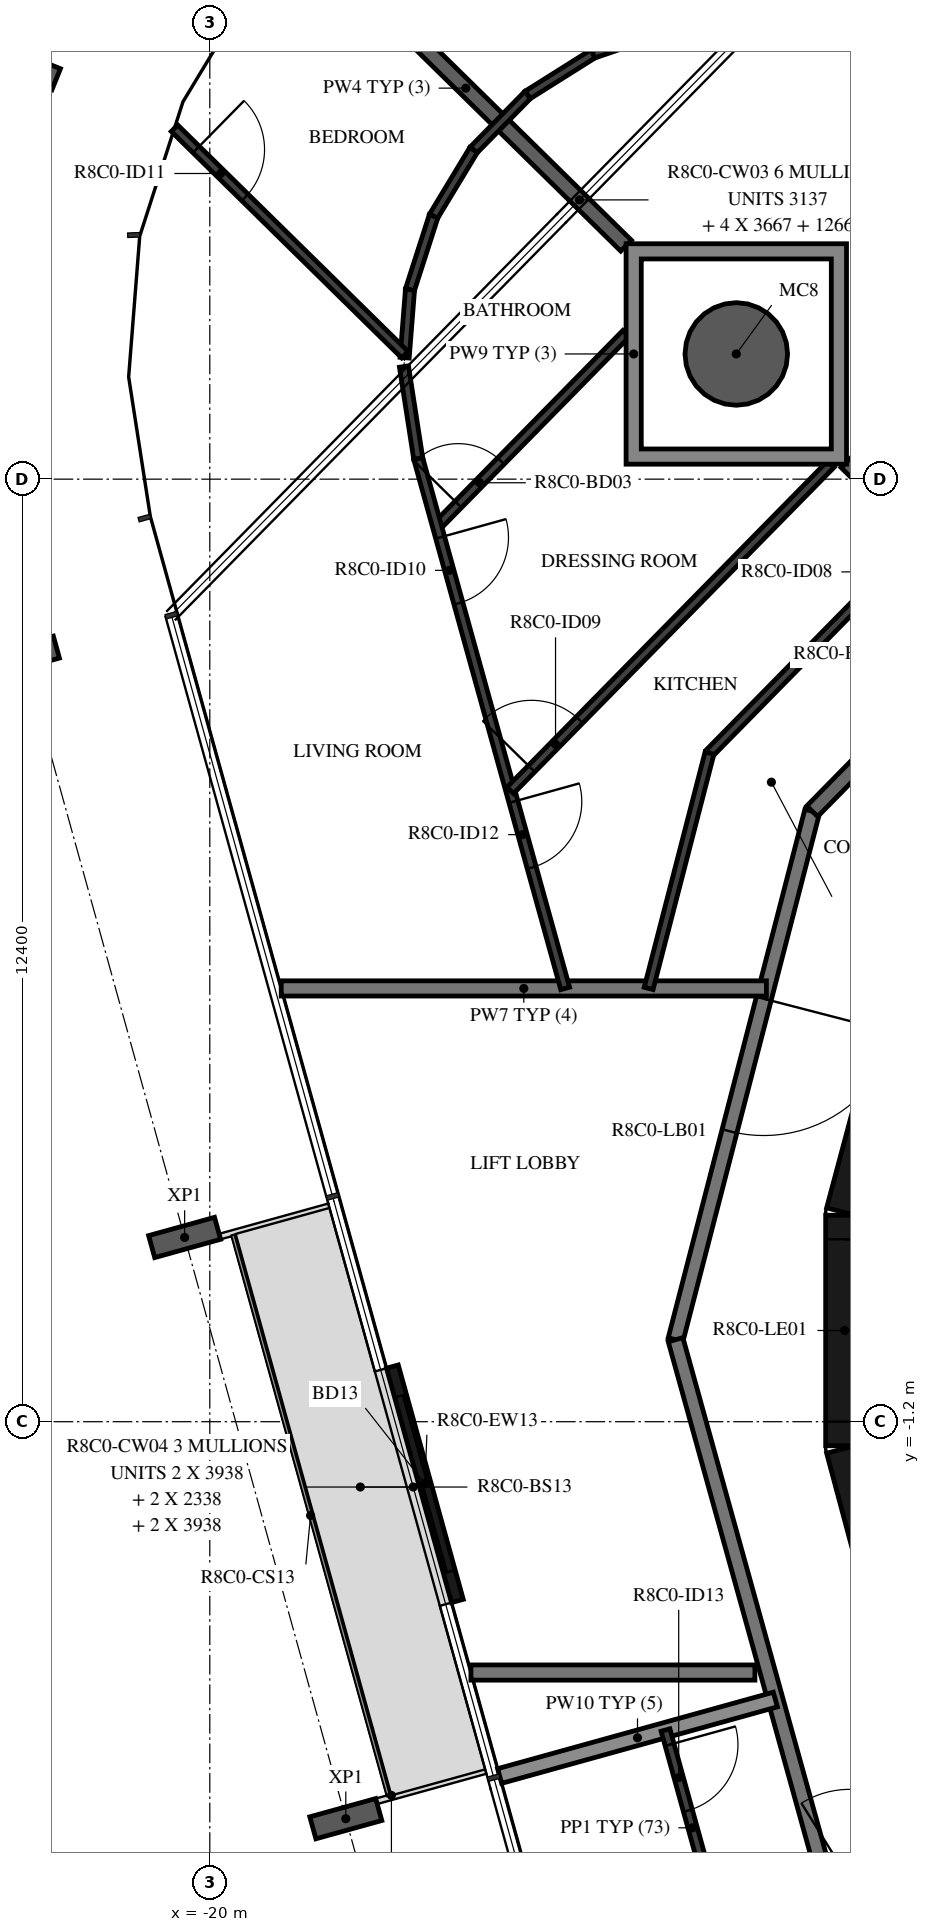
"""IFC4 building model, lengths in metres.
Left out: names, types, materials, properties, quantities, classifications, styles, units other than length and angle.
Written with IfcOpenShell. Run it as: python <this file> out.ifc"""

import sys

from ifc_helpers import new_model, si_unit, direction, frame, frame_2d, origin, origin_2d, place, context, subcontext, project, spatial, polyline, rectangle, hollow_circle, i_section, outline, extrude, element, fill, save


model = new_model("IFC4")
c1 = context("Model", 3, precision=1e-05, world=origin(), true_north=direction((0.0, 1.0)))
c2 = subcontext(c1, "Body", "Model", "MODEL_VIEW")
j1 = project(units=[si_unit("LENGTHUNIT", "METRE"), si_unit("PLANEANGLEUNIT", "RADIAN")], contexts=[c1])
p1 = place(None, origin())
s1 = spatial("IfcSite", under=j1, at=p1, CompositionType="ELEMENT")
p2 = place(p1, origin())
s2 = spatial("IfcBuilding", under=s1, at=p2, CompositionType="ELEMENT")
p3 = place(p2, frame((0.0, 0.0, 319.2)))
s3 = spatial("IfcBuildingStorey", under=s2, at=p3, CompositionType="ELEMENT", Elevation=319.2)
p4 = place(p3, frame((-13.073, 12.847, -0.38), z_axis=(0.0, 0.0, 1.0), x_axis=(1.0, 0.0, 0.0)))
e1 = element("IfcColumn", 1, at=p4, inside=s3, PredefinedType="COLUMN", context=c2, shape_type="SweptSolid", body=[
    extrude(hollow_circle(Radius=0.675, WallThickness=0.03, at=origin_2d()), origin(), (0.0, 0.0, 1.0), 3.5),
])
for number, where, z_axis, x_axis in (
    (2, (-22.438, 16.629, -0.38), (0.0, 0.0, 1.0), (0.374, 0.927, 0.0)),
    (3, (-22.452, 8.87, -0.38), (0.0, 0.0, 1.0), (-0.267, 0.964, 0.0)),
    (4, (-20.331, 1.224, -0.38), (0.0, 0.0, 1.0), (-0.267, 0.964, 0.0)),
    (5, (-18.211, -6.423, -0.38), (0.0, 0.0, 1.0), (-0.267, 0.964, 0.0)),
):
    element("IfcColumn", number, at=place(p3, frame(where, z_axis=z_axis, x_axis=x_axis)), inside=s3, PredefinedType="COLUMN", context=c2, shape_type="SweptSolid", body=[
        extrude(i_section(OverallWidth=0.3, OverallDepth=0.9, WebThickness=0.019, FlangeThickness=0.035, FilletRadius=0.03, at=origin_2d()), origin(), (0.0, 0.0, 1.0), 3.5),
    ])
p5 = place(p3, frame((-17.598, -0.475, 0.0), z_axis=(0.0, 0.0, 1.0), x_axis=(0.267266077957, -0.963622770369, 0.0)))
e6 = element("IfcWall", 6, at=p5, inside=s3, PredefinedType="STANDARD", context=c2, shape_type="SweptSolid", body=[
    extrude(rectangle(XDim=3.2, YDim=0.16, at=frame_2d((1.6, 0.0))), origin(), (0.0, 0.0, 1.0), 3.12),
])
p6 = place(p5, frame((0.4, 0.0, 0.0)))
e7 = element("IfcOpeningElement", 7, at=p6, cuts=e6, PredefinedType="OPENING", context=c2, shape_type="SweptSolid", body=[
    extrude(rectangle(XDim=2.4, YDim=2.4, at=frame_2d((1.2, 1.2))), frame((0.0, 0.09, 0.0), z_axis=(0.0, -1.0, 0.0), x_axis=(1.0, 0.0, 0.0)), (0.0, 0.0, 1.0), 0.18),
])
p7 = place(p3, frame((-10.858, 4.479, 0.0), z_axis=(0.0, 0.0, 1.0), x_axis=(-0.258734743916, -0.965948410781, 0.0)))
e8 = element("IfcWall", 8, at=p7, inside=s3, PredefinedType="SHEAR", context=c2, shape_type="SweptSolid", body=[
    extrude(rectangle(XDim=3.033, YDim=0.5, at=frame_2d((1.516, 0.0))), origin(), (0.0, 0.0, 1.0), 3.12),
])
p8 = place(p3, frame((-11.647, 1.516, 0.0), z_axis=(0.0, 0.0, 1.0), x_axis=(0.0, -1.0, 0.0)))
e9 = element("IfcWall", 9, at=p8, inside=s3, PredefinedType="SHEAR", context=c2, shape_type="SweptSolid", body=[
    extrude(rectangle(XDim=3.033, YDim=0.5, at=frame_2d((1.516, 0.0))), origin(), (0.0, 0.0, 1.0), 3.12),
])
p9 = place(p8, frame((0.316, 0.0, 0.0)))
e10 = element("IfcOpeningElement", 10, at=p9, cuts=e9, PredefinedType="OPENING", context=c2, shape_type="SweptSolid", body=[
    extrude(rectangle(XDim=2.4, YDim=2.1, at=frame_2d((1.2, 1.05))), frame((0.0, 0.26, 0.0), z_axis=(0.0, -1.0, 0.0), x_axis=(1.0, 0.0, 0.0)), (0.0, 0.0, 1.0), 0.52),
])
p10 = place(p3, frame((-11.643, -1.55, 0.0), z_axis=(0.0, 0.0, 1.0), x_axis=(0.258734743916, -0.965948410781, 0.0)))
e11 = element("IfcWall", 11, at=p10, inside=s3, PredefinedType="SHEAR", context=c2, shape_type="SweptSolid", body=[
    extrude(rectangle(XDim=3.033, YDim=0.5, at=frame_2d((1.516, 0.0))), origin(), (0.0, 0.0, 1.0), 3.12),
])
p11 = place(p10, frame((1.066, 0.0, 0.0)))
e12 = element("IfcOpeningElement", 12, at=p11, cuts=e11, PredefinedType="OPENING", context=c2, shape_type="SweptSolid", body=[
    extrude(rectangle(XDim=0.9, YDim=2.1, at=frame_2d((0.45, 1.05))), frame((0.0, 0.26, 0.0), z_axis=(0.0, -1.0, 0.0), x_axis=(1.0, 0.0, 0.0)), (0.0, 0.0, 1.0), 0.52),
])
p12 = place(p3, frame((-11.687, -7.303, 0.0), z_axis=(0.0, 0.0, 1.0), x_axis=(0.848064094072, 0.529893661357, 0.0)))
e13 = element("IfcWall", 13, at=p12, inside=s3, PredefinedType="PARTITIONING", context=c2, shape_type="SweptSolid", body=[
    extrude(rectangle(XDim=1.876, YDim=0.12, at=frame_2d((0.938, 0.0))), origin(), (0.0, 0.0, 1.0), 3.12),
])
p13 = place(p12, frame((0.125, 0.0, 0.0)))
e14 = element("IfcOpeningElement", 14, at=p13, cuts=e13, PredefinedType="OPENING", context=c2, shape_type="SweptSolid", body=[
    extrude(rectangle(XDim=1.2, YDim=2.1, at=frame_2d((0.6, 1.05))), frame((0.0, 0.07, 0.0), z_axis=(0.0, -1.0, 0.0), x_axis=(1.0, 0.0, 0.0)), (0.0, 0.0, 1.0), 0.14),
])
p14 = place(p3, frame((-12.074, 6.831, 0.0), z_axis=(0.0, 0.0, 1.0), x_axis=(-0.250391063186, -0.968144780225, 0.0)))
e15 = element("IfcWall", 15, at=p14, inside=s3, PredefinedType="STANDARD", context=c2, shape_type="SweptSolid", body=[
    extrude(rectangle(XDim=7.181, YDim=0.2, at=frame_2d((3.591, 0.0))), origin(), (0.0, 0.0, 1.0), 3.12),
])
p15 = place(p14, frame((2.548, 0.0, 0.0)))
e16 = element("IfcOpeningElement", 16, at=p15, cuts=e15, PredefinedType="OPENING", context=c2, shape_type="SweptSolid", body=[
    extrude(rectangle(XDim=1.8, YDim=2.1, at=frame_2d((0.9, 1.05))), frame((0.0, 0.11, 0.0), z_axis=(0.0, -1.0, 0.0), x_axis=(1.0, 0.0, 0.0)), (0.0, 0.0, 1.0), 0.22),
])
p16 = place(p3, frame((-13.872, -0.121, 0.0), z_axis=(0.0, 0.0, 1.0), x_axis=(0.267254575108, -0.963625960674, 0.0)))
e17 = element("IfcWall", 17, at=p16, inside=s3, PredefinedType="STANDARD", context=c2, shape_type="SweptSolid", body=[
    extrude(rectangle(XDim=7.181, YDim=0.2, at=frame_2d((3.591, 0.0))), origin(), (0.0, 0.0, 1.0), 3.12),
])
p17 = place(p3, frame((-7.041, 11.953, 0.0), z_axis=(0.0, 0.0, 1.0), x_axis=(-0.70090916255, -0.713250549143, 0.0)))
e18 = element("IfcWall", 18, at=p17, inside=s3, PredefinedType="STANDARD", context=c2, shape_type="SweptSolid", body=[
    extrude(rectangle(XDim=7.181, YDim=0.2, at=frame_2d((3.59, 0.0))), origin(), (0.0, 0.0, 1.0), 3.12),
])
p18 = place(p17, frame((2.39, 0.0, 0.0)))
e19 = element("IfcOpeningElement", 19, at=p18, cuts=e18, PredefinedType="OPENING", context=c2, shape_type="SweptSolid", body=[
    extrude(rectangle(XDim=1.0, YDim=2.1, at=frame_2d((0.5, 1.05))), frame((0.0, 0.11, 0.0), z_axis=(0.0, -1.0, 0.0), x_axis=(1.0, 0.0, 0.0)), (0.0, 0.0, 1.0), 0.22),
])
p19 = place(p17, frame((3.791, 0.0, 0.0)))
e20 = element("IfcOpeningElement", 20, at=p19, cuts=e18, PredefinedType="OPENING", context=c2, shape_type="SweptSolid", body=[
    extrude(rectangle(XDim=1.0, YDim=2.1, at=frame_2d((0.5, 1.05))), frame((0.0, 0.11, 0.0), z_axis=(0.0, -1.0, 0.0), x_axis=(1.0, 0.0, 0.0)), (0.0, 0.0, 1.0), 0.22),
])
p20 = place(p3, frame((-12.677, 4.5, 0.0), z_axis=(0.0, 0.0, 1.0), x_axis=(-1.0, 0.0, 0.0)))
e21 = element("IfcWall", 21, at=p20, inside=s3, PredefinedType="STANDARD", context=c2, shape_type="SweptSolid", body=[
    extrude(rectangle(XDim=6.383, YDim=0.2, at=frame_2d((3.192, 0.0))), origin(), (0.0, 0.0, 1.0), 3.12),
])
p21 = place(p3, frame((-16.564, -4.5, 0.0), z_axis=(0.0, 0.0, 1.0), x_axis=(1.0, 0.0, 0.0)))
e22 = element("IfcWall", 22, at=p21, inside=s3, PredefinedType="STANDARD", context=c2, shape_type="SweptSolid", body=[
    extrude(rectangle(XDim=3.736, YDim=0.2, at=frame_2d((1.868, 0.0))), origin(), (0.0, 0.0, 1.0), 3.12),
])
p22 = place(p3, frame((-11.623, 11.422, 0.0), z_axis=(0.0, 0.0, 1.0), x_axis=(0.713233657229, -0.700926351478, 0.0)))
e23 = element("IfcWall", 23, at=p22, inside=s3, PredefinedType="STANDARD", context=c2, shape_type="SweptSolid", body=[
    extrude(rectangle(XDim=2.896, YDim=0.2, at=frame_2d((1.448, 0.0))), origin(), (0.0, 0.0, 1.0), 3.12),
])
p23 = place(p3, frame((-18.741, 18.417, 0.0), z_axis=(0.0, 0.0, 1.0), x_axis=(0.713252414586, -0.700907264256, 0.0)))
e24 = element("IfcWall", 24, at=p23, inside=s3, PredefinedType="STANDARD", context=c2, shape_type="SweptSolid", body=[
    extrude(rectangle(XDim=5.913, YDim=0.2, at=frame_2d((2.957, 0.0))), origin(), (0.0, 0.0, 1.0), 3.12),
])
p24 = place(p3, frame((-16.187, -5.862, 0.0), z_axis=(0.0, 0.0, 1.0), x_axis=(0.963631166683, 0.267235803358, 0.0)))
e25 = element("IfcWall", 25, at=p24, inside=s3, PredefinedType="STANDARD", context=c2, shape_type="SweptSolid", body=[
    extrude(rectangle(XDim=3.765, YDim=0.2, at=frame_2d((1.882, 0.0))), origin(), (0.0, 0.0, 1.0), 2.73),
])
p25 = place(p3, frame((-8.413, 12.698, 0.0), z_axis=(0.0, 0.0, 1.0), x_axis=(-0.700901588882, -0.713257991686, 0.0)))
e26 = element("IfcWall", 26, at=p25, inside=s3, PredefinedType="PARTITIONING", context=c2, shape_type="SweptSolid", body=[
    extrude(rectangle(XDim=7.153, YDim=0.12, at=frame_2d((3.576, 0.0))), origin(), (0.0, 0.0, 1.0), 3.12),
])
p26 = place(p25, frame((3.36, 0.0, 0.0)))
e27 = element("IfcOpeningElement", 27, at=p26, cuts=e26, PredefinedType="OPENING", context=c2, shape_type="SweptSolid", body=[
    extrude(rectangle(XDim=0.9, YDim=2.1, at=frame_2d((0.45, 1.05))), frame((0.0, 0.07, 0.0), z_axis=(0.0, -1.0, 0.0), x_axis=(1.0, 0.0, 0.0)), (0.0, 0.0, 1.0), 0.14),
])
p27 = place(p3, frame((-11.769, 17.054, 0.0), z_axis=(0.0, 0.0, 1.0), x_axis=(0.968146475492, -0.250384508293, 0.0)))
e28 = element("IfcWall", 28, at=p27, inside=s3, PredefinedType="PARTITIONING", context=c2, shape_type="SweptSolid", body=[
    extrude(rectangle(XDim=9.359, YDim=0.12, at=frame_2d((4.679, 0.0))), origin(), (0.0, 0.0, 1.0), 3.12),
])
p28 = place(p27, frame((1.276, 0.0, 0.0)))
e29 = element("IfcOpeningElement", 29, at=p28, cuts=e28, PredefinedType="OPENING", context=c2, shape_type="SweptSolid", body=[
    extrude(rectangle(XDim=0.9, YDim=2.1, at=frame_2d((0.45, 1.05))), frame((0.0, 0.07, 0.0), z_axis=(0.0, -1.0, 0.0), x_axis=(1.0, 0.0, 0.0)), (0.0, 0.0, 1.0), 0.14),
])
for number, where, z_axis, x_axis in (
    (30, (-16.529, 15.531, 0.0), (0.0, 0.0, 1.0), (0.701, 0.713, 0.0)),
    (31, (-15.817, 16.256, 0.0), (0.0, 0.0, 1.0), (0.847, 0.532, 0.0)),
    (32, (-14.957, 16.796, 0.0), (0.0, 0.0, 1.0), (0.946, 0.323, 0.0)),
):
    element("IfcWall", number, at=place(p3, frame(where, z_axis=z_axis, x_axis=x_axis)), inside=s3, PredefinedType="PARTITIONING", context=c2, shape_type="SweptSolid", body=[
        extrude(rectangle(XDim=1.016, YDim=0.12, at=frame_2d((0.508, 0.0))), origin(), (0.0, 0.0, 1.0), 3.12),
    ])
p29 = place(p3, frame((-13.426, 7.596, 0.0), z_axis=(0.0, 0.0, 1.0), x_axis=(-0.250342106136, -0.968157440655, 0.0)))
e33 = element("IfcWall", 33, at=p29, inside=s3, PredefinedType="PARTITIONING", context=c2, shape_type="SweptSolid", body=[
    extrude(rectangle(XDim=3.198, YDim=0.12, at=frame_2d((1.599, 0.0))), origin(), (0.0, 0.0, 1.0), 3.12),
])
p30 = place(p3, frame((-17.437, 12.798, 0.0), z_axis=(0.0, 0.0, 1.0), x_axis=(0.078482315782, 0.996915506003, 0.0)))
e34 = element("IfcWall", 34, at=p30, inside=s3, PredefinedType="PARTITIONING", context=c2, shape_type="SweptSolid", body=[
    extrude(rectangle(XDim=0.899, YDim=0.12, at=frame_2d((0.449, 0.0))), origin(), (0.0, 0.0, 1.0), 3.12),
])
for number, where, z_axis, x_axis in (
    (35, (-17.366, 13.695, 0.0), (0.0, 0.0, 1.0), (0.306, 0.952, 0.0)),
    (36, (-17.055, 14.662, 0.0), (0.0, 0.0, 1.0), (0.517, 0.856, 0.0)),
):
    element("IfcWall", number, at=place(p3, frame(where, z_axis=z_axis, x_axis=x_axis)), inside=s3, PredefinedType="PARTITIONING", context=c2, shape_type="SweptSolid", body=[
        extrude(rectangle(XDim=1.016, YDim=0.12, at=frame_2d((0.508, 0.0))), origin(), (0.0, 0.0, 1.0), 3.12),
    ])
p31 = place(p3, frame((-20.465, 15.817, 0.0), z_axis=(0.0, 0.0, 1.0), x_axis=(0.713254811643, -0.700904824971, 0.0)))
e37 = element("IfcWall", 37, at=p31, inside=s3, PredefinedType="PARTITIONING", context=c2, shape_type="SweptSolid", body=[
    extrude(rectangle(XDim=4.25, YDim=0.12, at=frame_2d((2.125, 0.0))), origin(), (0.0, 0.0, 1.0), 3.12),
])
p32 = place(p31, frame((0.4, 0.0, 0.0)))
e38 = element("IfcOpeningElement", 38, at=p32, cuts=e37, PredefinedType="OPENING", context=c2, shape_type="SweptSolid", body=[
    extrude(rectangle(XDim=0.9, YDim=2.1, at=frame_2d((0.45, 1.05))), frame((0.0, 0.07, 0.0), z_axis=(0.0, -1.0, 0.0), x_axis=(1.0, 0.0, 0.0)), (0.0, 0.0, 1.0), 0.14),
])
p33 = place(p3, frame((-17.011, 10.582, 0.0), z_axis=(0.0, 0.0, 1.0), x_axis=(0.700924288011, 0.713235685083, 0.0)))
e39 = element("IfcWall", 39, at=p33, inside=s3, PredefinedType="PARTITIONING", context=c2, shape_type="SweptSolid", body=[
    extrude(rectangle(XDim=3.55, YDim=0.12, at=frame_2d((1.775, 0.0))), origin(), (0.0, 0.0, 1.0), 3.12),
])
p34 = place(p33, frame((0.4, 0.0, 0.0)))
e40 = element("IfcOpeningElement", 40, at=p34, cuts=e39, PredefinedType="OPENING", context=c2, shape_type="SweptSolid", body=[
    extrude(rectangle(XDim=0.8, YDim=2.1, at=frame_2d((0.4, 1.05))), frame((0.0, 0.07, 0.0), z_axis=(0.0, -1.0, 0.0), x_axis=(1.0, 0.0, 0.0)), (0.0, 0.0, 1.0), 0.14),
])
p35 = place(p3, frame((-17.446, 12.682, 0.0), z_axis=(0.0, 0.0, 1.0), x_axis=(0.153612025092, -0.988131239131, 0.0)))
e41 = element("IfcWall", 41, at=p35, inside=s3, PredefinedType="PARTITIONING", context=c2, shape_type="SweptSolid", body=[
    extrude(rectangle(XDim=1.227, YDim=0.12, at=frame_2d((0.614, 0.0))), origin(), (0.0, 0.0, 1.0), 3.12),
])
p36 = place(p3, frame((-17.257, 11.469, 0.0), z_axis=(0.0, 0.0, 1.0), x_axis=(0.267222501114, -0.963634855585, 0.0)))
e42 = element("IfcWall", 42, at=p36, inside=s3, PredefinedType="PARTITIONING", context=c2, shape_type="SweptSolid", body=[
    extrude(rectangle(XDim=7.232, YDim=0.12, at=frame_2d((3.616, 0.0))), origin(), (0.0, 0.0, 1.0), 3.12),
])
p37 = place(p36, frame((1.074, 0.0, 0.0)))
e43 = element("IfcOpeningElement", 43, at=p37, cuts=e42, PredefinedType="OPENING", context=c2, shape_type="SweptSolid", body=[
    extrude(rectangle(XDim=0.9, YDim=2.1, at=frame_2d((0.45, 1.05))), frame((0.0, 0.07, 0.0), z_axis=(0.0, -1.0, 0.0), x_axis=(1.0, 0.0, 0.0)), (0.0, 0.0, 1.0), 0.14),
])
p38 = place(p36, frame((4.682, 0.0, 0.0)))
e44 = element("IfcOpeningElement", 44, at=p38, cuts=e42, PredefinedType="OPENING", context=c2, shape_type="SweptSolid", body=[
    extrude(rectangle(XDim=0.9, YDim=2.1, at=frame_2d((0.45, 1.05))), frame((0.0, 0.07, 0.0), z_axis=(0.0, -1.0, 0.0), x_axis=(1.0, 0.0, 0.0)), (0.0, 0.0, 1.0), 0.14),
])
p39 = place(p3, frame((-16.047, 7.105, 0.0), z_axis=(0.0, 0.0, 1.0), x_axis=(0.700892382646, 0.713267038316, 0.0)))
e45 = element("IfcWall", 45, at=p39, inside=s3, PredefinedType="PARTITIONING", context=c2, shape_type="SweptSolid", body=[
    extrude(rectangle(XDim=6.017, YDim=0.12, at=frame_2d((3.009, 0.0))), origin(), (0.0, 0.0, 1.0), 3.12),
])
p40 = place(p39, frame((0.4, 0.0, 0.0)))
e46 = element("IfcOpeningElement", 46, at=p40, cuts=e45, PredefinedType="OPENING", context=c2, shape_type="SweptSolid", body=[
    extrude(rectangle(XDim=0.9, YDim=2.1, at=frame_2d((0.45, 1.05))), frame((0.0, 0.07, 0.0), z_axis=(0.0, -1.0, 0.0), x_axis=(1.0, 0.0, 0.0)), (0.0, 0.0, 1.0), 0.14),
])
p41 = place(p3, frame((-14.005, -5.256, 0.0), z_axis=(0.0, 0.0, 1.0), x_axis=(0.267200500487, -0.963640956238, 0.0)))
e47 = element("IfcWall", 47, at=p41, inside=s3, PredefinedType="PARTITIONING", context=c2, shape_type="SweptSolid", body=[
    extrude(rectangle(XDim=2.67, YDim=0.12, at=frame_2d((1.335, 0.0))), origin(), (0.0, 0.0, 1.0), 3.12),
])
p42 = place(p41, frame((0.2, 0.0, 0.0)))
e48 = element("IfcOpeningElement", 48, at=p42, cuts=e47, PredefinedType="OPENING", context=c2, shape_type="SweptSolid", body=[
    extrude(rectangle(XDim=0.9, YDim=2.1, at=frame_2d((0.45, 1.05))), frame((0.0, 0.07, 0.0), z_axis=(0.0, -1.0, 0.0), x_axis=(1.0, 0.0, 0.0)), (0.0, 0.0, 1.0), 0.14),
])
p43 = place(p3, origin())
e49 = element("IfcWall", 49, at=p43, inside=s3, PredefinedType="STANDARD", context=c2, shape_type="SweptSolid", body=[
    extrude(outline(polyline([(-11.623, 14.297), (-11.623, 11.397), (-14.523, 11.397), (-14.523, 14.297), (-11.623, 14.297)]), holes=[polyline([(-14.323, 11.597), (-11.823, 11.597), (-11.823, 14.097), (-14.323, 14.097), (-14.323, 11.597)])]), origin(), (0.0, 0.0, 1.0), 3.12),
])
p44 = place(p6, origin())
e50 = element("IfcDoor", 50, at=p44, inside=s3, OperationType="DOUBLE_DOOR_SLIDING", PredefinedType="DOOR", context=c2, shape_type="SweptSolid", body=[
    extrude(rectangle(XDim=2.4, YDim=2.4, at=frame_2d((1.2, 1.2))), frame((0.0, 0.025, 0.0), z_axis=(0.0, -1.0, 0.0), x_axis=(1.0, 0.0, 0.0)), (0.0, 0.0, 1.0), 0.05),
])
fill(e7, e50)
p45 = place(p9, origin())
e51 = element("IfcDoor", 51, at=p45, inside=s3, OperationType="DOUBLE_DOOR_SINGLE_SWING", PredefinedType="DOOR", context=c2, shape_type="SweptSolid", body=[
    extrude(rectangle(XDim=2.4, YDim=2.1, at=frame_2d((1.2, 1.05))), frame((0.0, 0.025, 0.0), z_axis=(0.0, -1.0, 0.0), x_axis=(1.0, 0.0, 0.0)), (0.0, 0.0, 1.0), 0.05),
])
fill(e10, e51)
p46 = place(p40, origin())
e52 = element("IfcDoor", 52, at=p46, inside=s3, OperationType="SINGLE_SWING_LEFT", PredefinedType="DOOR", context=c2, shape_type="SweptSolid", body=[
    extrude(rectangle(XDim=0.9, YDim=2.1, at=frame_2d((0.45, 1.05))), frame((0.0, 0.025, 0.0), z_axis=(0.0, -1.0, 0.0), x_axis=(1.0, 0.0, 0.0)), (0.0, 0.0, 1.0), 0.05),
])
fill(e46, e52)
p47 = place(p34, origin())
e53 = element("IfcDoor", 53, at=p47, inside=s3, OperationType="SINGLE_SWING_LEFT", PredefinedType="DOOR", context=c2, shape_type="SweptSolid", body=[
    extrude(rectangle(XDim=0.8, YDim=2.1, at=frame_2d((0.4, 1.05))), frame((0.0, 0.025, 0.0), z_axis=(0.0, -1.0, 0.0), x_axis=(1.0, 0.0, 0.0)), (0.0, 0.0, 1.0), 0.05),
])
fill(e40, e53)
p48 = place(p37, origin())
e54 = element("IfcDoor", 54, at=p48, inside=s3, OperationType="SINGLE_SWING_LEFT", PredefinedType="DOOR", context=c2, shape_type="SweptSolid", body=[
    extrude(rectangle(XDim=0.9, YDim=2.1, at=frame_2d((0.45, 1.05))), frame((0.0, 0.025, 0.0), z_axis=(0.0, -1.0, 0.0), x_axis=(1.0, 0.0, 0.0)), (0.0, 0.0, 1.0), 0.05),
])
fill(e43, e54)
p49 = place(p32, origin())
e55 = element("IfcDoor", 55, at=p49, inside=s3, OperationType="SINGLE_SWING_LEFT", PredefinedType="DOOR", context=c2, shape_type="SweptSolid", body=[
    extrude(rectangle(XDim=0.9, YDim=2.1, at=frame_2d((0.45, 1.05))), frame((0.0, 0.025, 0.0), z_axis=(0.0, -1.0, 0.0), x_axis=(1.0, 0.0, 0.0)), (0.0, 0.0, 1.0), 0.05),
])
fill(e38, e55)
p50 = place(p38, origin())
e56 = element("IfcDoor", 56, at=p50, inside=s3, OperationType="SINGLE_SWING_RIGHT", PredefinedType="DOOR", context=c2, shape_type="SweptSolid", body=[
    extrude(rectangle(XDim=0.9, YDim=2.1, at=frame_2d((0.45, 1.05))), frame((0.0, 0.025, 0.0), z_axis=(0.0, -1.0, 0.0), x_axis=(1.0, 0.0, 0.0)), (0.0, 0.0, 1.0), 0.05),
])
fill(e44, e56)
p51 = place(p42, origin())
e57 = element("IfcDoor", 57, at=p51, inside=s3, OperationType="SINGLE_SWING_RIGHT", PredefinedType="DOOR", context=c2, shape_type="SweptSolid", body=[
    extrude(rectangle(XDim=0.9, YDim=2.1, at=frame_2d((0.45, 1.05))), frame((0.0, 0.025, 0.0), z_axis=(0.0, -1.0, 0.0), x_axis=(1.0, 0.0, 0.0)), (0.0, 0.0, 1.0), 0.05),
])
fill(e48, e57)
p52 = place(p13, origin())
e58 = element("IfcDoor", 58, at=p52, inside=s3, OperationType="DOUBLE_DOOR_SINGLE_SWING", PredefinedType="DOOR", context=c2, shape_type="SweptSolid", body=[
    extrude(rectangle(XDim=1.2, YDim=2.1, at=frame_2d((0.6, 1.05))), frame((0.0, 0.025, 0.0), z_axis=(0.0, -1.0, 0.0), x_axis=(1.0, 0.0, 0.0)), (0.0, 0.0, 1.0), 0.05),
])
fill(e14, e58)
p53 = place(p15, origin())
e59 = element("IfcDoor", 59, at=p53, inside=s3, OperationType="DOUBLE_DOOR_SINGLE_SWING", PredefinedType="DOOR", context=c2, shape_type="SweptSolid", body=[
    extrude(rectangle(XDim=1.8, YDim=2.1, at=frame_2d((0.9, 1.05))), frame((0.0, 0.025, 0.0), z_axis=(0.0, -1.0, 0.0), x_axis=(1.0, 0.0, 0.0)), (0.0, 0.0, 1.0), 0.05),
])
fill(e16, e59)
save(model, sys.argv[1])
